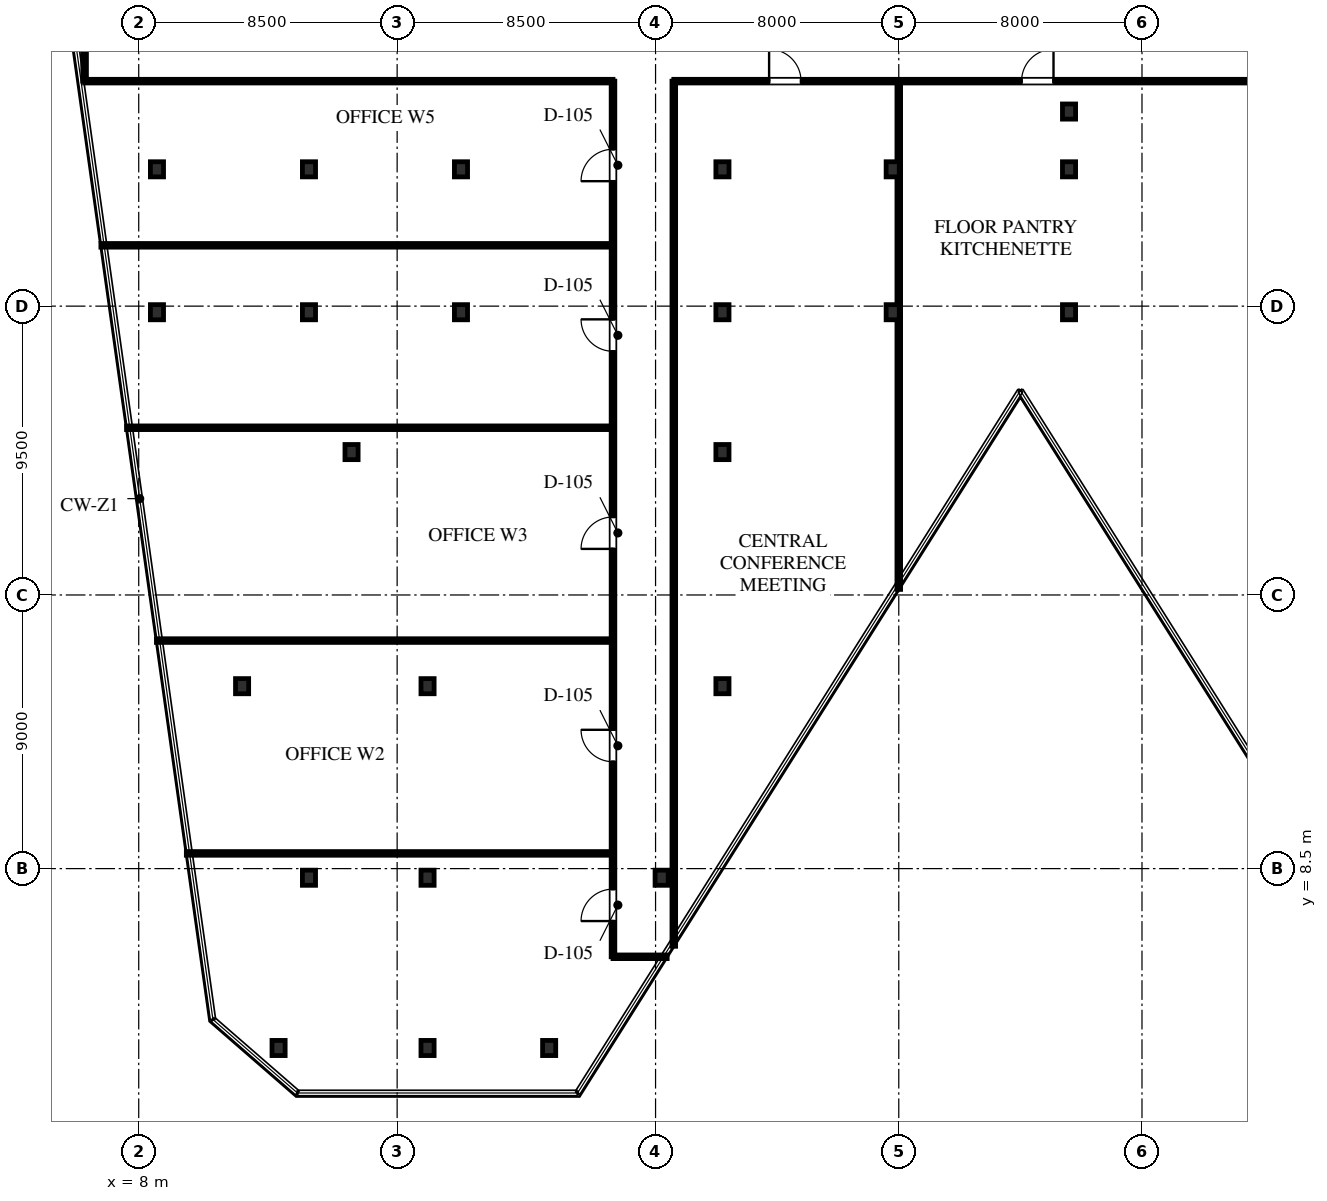
"""IFC4 building model, lengths in metres.
Left out: names, types, materials, properties, quantities, classifications, styles, units other than length and angle.
Written with IfcOpenShell. Run it as: python <this file> out.ifc"""

import sys

from ifc_helpers import new_model, si_unit, direction, frame, frame_2d, origin, origin_2d, place, context, subcontext, project, spatial, rectangle, i_section, extrude, element, fill, save


model = new_model("IFC4")
c1 = context("Model", 3, precision=1e-05, world=origin(), true_north=direction((0.0, 1.0)))
c2 = subcontext(c1, "Body", "Model", "MODEL_VIEW")
j1 = project(units=[si_unit("LENGTHUNIT", "METRE"), si_unit("PLANEANGLEUNIT", "RADIAN")], contexts=[c1])
p1 = place(None, origin())
s1 = spatial("IfcSite", under=j1, at=p1, CompositionType="ELEMENT")
p2 = place(p1, origin())
s2 = spatial("IfcBuilding", under=s1, at=p2, CompositionType="ELEMENT")
p3 = place(p2, frame((0.0, 0.0, 61.5)))
s3 = spatial("IfcBuildingStorey", under=s2, at=p3, CompositionType="ELEMENT", Elevation=61.5)
for number, where, z_axis, x_axis in (
    (1, (12.6, 2.6, 0.0), (0.0, 0.0, 1.0), (1.0, 0.0, 0.0)),
    (2, (15.0, 22.2, 0.0), (0.0, 0.0, 1.0), (1.0, 0.0, 0.0)),
    (3, (27.2, 22.2, 0.0), (0.0, 0.0, 1.0), (1.0, 0.0, 0.0)),
    (4, (8.6, 26.8, 0.0), (0.0, 0.0, 1.0), (1.0, 0.0, 0.0)),
    (5, (13.6, 26.8, 0.0), (0.0, 0.0, 1.0), (1.0, 0.0, 0.0)),
    (6, (18.6, 26.8, 0.0), (0.0, 0.0, 1.0), (1.0, 0.0, 0.0)),
    (7, (27.2, 26.8, 0.0), (0.0, 0.0, 1.0), (1.0, 0.0, 0.0)),
    (8, (32.8, 26.8, 0.0), (0.0, 0.0, 1.0), (1.0, 0.0, 0.0)),
    (9, (38.6, 26.8, 0.0), (0.0, 0.0, 1.0), (1.0, 0.0, 0.0)),
    (10, (8.6, 31.5, 0.0), (0.0, 0.0, 1.0), (1.0, 0.0, 0.0)),
    (11, (13.6, 31.5, 0.0), (0.0, 0.0, 1.0), (1.0, 0.0, 0.0)),
    (12, (17.5, 2.6, 0.0), (0.0, 0.0, 1.0), (1.0, 0.0, 0.0)),
    (13, (18.6, 31.5, 0.0), (0.0, 0.0, 1.0), (1.0, 0.0, 0.0)),
    (14, (27.2, 31.5, 0.0), (0.0, 0.0, 1.0), (1.0, 0.0, 0.0)),
    (15, (32.8, 31.5, 0.0), (0.0, 0.0, 1.0), (1.0, 0.0, 0.0)),
    (16, (38.6, 31.5, 0.0), (0.0, 0.0, 1.0), (1.0, 0.0, 0.0)),
    (17, (21.5, 2.6, 0.0), (0.0, 0.0, 1.0), (1.0, 0.0, 0.0)),
    (18, (13.6, 8.2, 0.0), (0.0, 0.0, 1.0), (1.0, 0.0, 0.0)),
    (19, (17.5, 8.2, 0.0), (0.0, 0.0, 1.0), (1.0, 0.0, 0.0)),
    (20, (25.2, 8.2, 0.0), (0.0, 0.0, 1.0), (1.0, 0.0, 0.0)),
    (21, (11.4, 14.5, 0.0), (0.0, 0.0, 1.0), (1.0, 0.0, 0.0)),
    (22, (17.5, 14.5, 0.0), (0.0, 0.0, 1.0), (1.0, 0.0, 0.0)),
    (23, (27.2, 14.5, 0.0), (0.0, 0.0, 1.0), (1.0, 0.0, 0.0)),
    (24, (38.6, 33.4, 0.0), (0.0, 0.0, 1.0), (1.0, 0.0, 0.0)),
):
    element("IfcColumn", number, at=place(p3, frame(where, z_axis=z_axis, x_axis=x_axis)), inside=s3, PredefinedType="COLUMN", context=c2, shape_type="SweptSolid", body=[
        extrude(i_section(OverallWidth=0.432, OverallDepth=0.498, WebThickness=0.056, FlangeThickness=0.089, FilletRadius=0.03, at=origin_2d()), origin(), (0.0, 0.0, 1.0), 4.0),
    ])
p4 = place(p3, frame((6.22, 34.4, 0.0), z_axis=(0.0, 0.0, 1.0), x_axis=(1.0, 0.0, 0.0)))
e25 = element("IfcWall", 25, at=p4, inside=s3, PredefinedType="PARTITIONING", context=c2, shape_type="SweptSolid", body=[
    extrude(rectangle(XDim=17.38, YDim=0.12, at=frame_2d((8.69, 0.0))), origin(), (0.0, 0.0, 1.0), 2.813),
])
p5 = place(p3, frame((25.6, 34.4, 0.0), z_axis=(0.0, 0.0, 1.0), x_axis=(1.0, 0.0, 0.0)))
e26 = element("IfcWall", 26, at=p5, inside=s3, PredefinedType="PARTITIONING", context=c2, shape_type="SweptSolid", body=[
    extrude(rectangle(XDim=27.5, YDim=0.12, at=frame_2d((13.75, 0.0))), origin(), (0.0, 0.0, 1.0), 2.813),
])
p6 = place(p5, frame((3.135, 0.0, 0.0)))
e27 = element("IfcOpeningElement", 27, at=p6, cuts=e26, PredefinedType="OPENING", context=c2, shape_type="SweptSolid", body=[
    extrude(rectangle(XDim=1.05, YDim=2.2, at=frame_2d((0.525, 1.1))), frame((0.0, 0.07, 0.0), z_axis=(0.0, -1.0, 0.0), x_axis=(1.0, 0.0, 0.0)), (0.0, 0.0, 1.0), 0.14),
])
p7 = place(p5, frame((11.44, 0.0, 0.0)))
e28 = element("IfcOpeningElement", 28, at=p7, cuts=e26, PredefinedType="OPENING", context=c2, shape_type="SweptSolid", body=[
    extrude(rectangle(XDim=1.05, YDim=2.2, at=frame_2d((0.525, 1.1))), frame((0.0, 0.07, 0.0), z_axis=(0.0, -1.0, 0.0), x_axis=(1.0, 0.0, 0.0)), (0.0, 0.0, 1.0), 0.14),
])
p8 = place(p3, frame((6.22, 34.4, 0.0), z_axis=(0.0, 0.0, 1.0), x_axis=(0.0, 1.0, 0.0)))
e29 = element("IfcWall", 29, at=p8, inside=s3, PredefinedType="PARTITIONING", context=c2, shape_type="SweptSolid", body=[
    extrude(rectangle(XDim=3.65, YDim=0.12, at=frame_2d((1.825, 0.0))), origin(), (0.0, 0.0, 1.0), 3.74),
])
p9 = place(p3, frame((23.6, 5.6, 0.0), z_axis=(0.0, 0.0, 1.0), x_axis=(0.0, 1.0, 0.0)))
e30 = element("IfcWall", 30, at=p9, inside=s3, PredefinedType="PARTITIONING", context=c2, shape_type="SweptSolid", body=[
    extrude(rectangle(XDim=28.8, YDim=0.12, at=frame_2d((14.4, 0.0))), origin(), (0.0, 0.0, 1.0), 2.813),
])
p10 = place(p9, frame((1.175, 0.0, 0.0)))
e31 = element("IfcOpeningElement", 31, at=p10, cuts=e30, PredefinedType="OPENING", context=c2, shape_type="SweptSolid", body=[
    extrude(rectangle(XDim=1.05, YDim=2.2, at=frame_2d((0.525, 1.1))), frame((0.0, 0.07, 0.0), z_axis=(0.0, -1.0, 0.0), x_axis=(1.0, 0.0, 0.0)), (0.0, 0.0, 1.0), 0.14),
])
p11 = place(p9, frame((6.416, 0.0, 0.0)))
e32 = element("IfcOpeningElement", 32, at=p11, cuts=e30, PredefinedType="OPENING", context=c2, shape_type="SweptSolid", body=[
    extrude(rectangle(XDim=1.05, YDim=2.2, at=frame_2d((0.525, 1.1))), frame((0.0, 0.07, 0.0), z_axis=(0.0, -1.0, 0.0), x_axis=(1.0, 0.0, 0.0)), (0.0, 0.0, 1.0), 0.14),
])
p12 = place(p9, frame((13.416, 0.0, 0.0)))
e33 = element("IfcOpeningElement", 33, at=p12, cuts=e30, PredefinedType="OPENING", context=c2, shape_type="SweptSolid", body=[
    extrude(rectangle(XDim=1.05, YDim=2.2, at=frame_2d((0.525, 1.1))), frame((0.0, 0.07, 0.0), z_axis=(0.0, -1.0, 0.0), x_axis=(1.0, 0.0, 0.0)), (0.0, 0.0, 1.0), 0.14),
])
p13 = place(p9, frame((19.915, 0.0, 0.0)))
e34 = element("IfcOpeningElement", 34, at=p13, cuts=e30, PredefinedType="OPENING", context=c2, shape_type="SweptSolid", body=[
    extrude(rectangle(XDim=1.05, YDim=2.2, at=frame_2d((0.525, 1.1))), frame((0.0, 0.07, 0.0), z_axis=(0.0, -1.0, 0.0), x_axis=(1.0, 0.0, 0.0)), (0.0, 0.0, 1.0), 0.14),
])
p14 = place(p9, frame((25.51, 0.0, 0.0)))
e35 = element("IfcOpeningElement", 35, at=p14, cuts=e30, PredefinedType="OPENING", context=c2, shape_type="SweptSolid", body=[
    extrude(rectangle(XDim=1.05, YDim=2.2, at=frame_2d((0.525, 1.1))), frame((0.0, 0.07, 0.0), z_axis=(0.0, -1.0, 0.0), x_axis=(1.0, 0.0, 0.0)), (0.0, 0.0, 1.0), 0.14),
])
p15 = place(p3, frame((25.6, 5.945, 0.0), z_axis=(0.0, 0.0, 1.0), x_axis=(0.0, 1.0, 0.0)))
e36 = element("IfcWall", 36, at=p15, inside=s3, PredefinedType="PARTITIONING", context=c2, shape_type="SweptSolid", body=[
    extrude(rectangle(XDim=28.455, YDim=0.12, at=frame_2d((14.227, 0.0))), origin(), (0.0, 0.0, 1.0), 2.813),
])
p16 = place(p3, frame((23.6, 5.6, 0.0), z_axis=(0.0, 0.0, 1.0), x_axis=(1.0, 0.0, 0.0)))
e37 = element("IfcWall", 37, at=p16, inside=s3, PredefinedType="PARTITIONING", context=c2, shape_type="SweptSolid", body=[
    extrude(rectangle(XDim=1.782, YDim=0.12, at=frame_2d((0.891, 0.0))), origin(), (0.0, 0.0, 1.0), 2.978),
])
p17 = place(p3, frame((9.566, 9.0, 0.0), z_axis=(0.0, 0.0, 1.0), x_axis=(1.0, 0.0, 0.0)))
e38 = element("IfcWall", 38, at=p17, inside=s3, PredefinedType="PARTITIONING", context=c2, shape_type="SweptSolid", body=[
    extrude(rectangle(XDim=13.966, YDim=0.12, at=frame_2d((6.983, 0.0))), origin(), (0.0, 0.0, 1.0), 2.813),
])
p18 = place(p3, frame((8.583, 16.0, 0.0), z_axis=(0.0, 0.0, 1.0), x_axis=(1.0, 0.0, 0.0)))
e39 = element("IfcWall", 39, at=p18, inside=s3, PredefinedType="PARTITIONING", context=c2, shape_type="SweptSolid", body=[
    extrude(rectangle(XDim=14.949, YDim=0.12, at=frame_2d((7.475, 0.0))), origin(), (0.0, 0.0, 1.0), 2.978),
])
p19 = place(p3, frame((7.599, 23.0, 0.0), z_axis=(0.0, 0.0, 1.0), x_axis=(1.0, 0.0, 0.0)))
e40 = element("IfcWall", 40, at=p19, inside=s3, PredefinedType="PARTITIONING", context=c2, shape_type="SweptSolid", body=[
    extrude(rectangle(XDim=15.933, YDim=0.12, at=frame_2d((7.967, 0.0))), origin(), (0.0, 0.0, 1.0), 2.978),
])
p20 = place(p3, frame((6.756, 29.0, 0.0), z_axis=(0.0, 0.0, 1.0), x_axis=(1.0, 0.0, 0.0)))
e41 = element("IfcWall", 41, at=p20, inside=s3, PredefinedType="PARTITIONING", context=c2, shape_type="SweptSolid", body=[
    extrude(rectangle(XDim=16.776, YDim=0.12, at=frame_2d((8.388, 0.0))), origin(), (0.0, 0.0, 1.0), 2.813),
])
p21 = place(p3, frame((33.0, 17.683, 0.0), z_axis=(0.0, 0.0, 1.0), x_axis=(0.0, 1.0, 0.0)))
e42 = element("IfcWall", 42, at=p21, inside=s3, PredefinedType="PARTITIONING", context=c2, shape_type="SweptSolid", body=[
    extrude(rectangle(XDim=16.649, YDim=0.12, at=frame_2d((8.324, 0.0))), origin(), (0.0, 0.0, 1.0), 2.813),
])
p22 = place(p10, origin())
e43 = element("IfcDoor", 43, at=p22, inside=s3, OperationType="SINGLE_SWING_LEFT", PredefinedType="DOOR", context=c2, shape_type="SweptSolid", body=[
    extrude(rectangle(XDim=1.05, YDim=2.2, at=frame_2d((0.525, 1.1))), frame((0.0, 0.025, 0.0), z_axis=(0.0, -1.0, 0.0), x_axis=(1.0, 0.0, 0.0)), (0.0, 0.0, 1.0), 0.05),
])
fill(e31, e43)
p23 = place(p11, origin())
e44 = element("IfcDoor", 44, at=p23, inside=s3, OperationType="SINGLE_SWING_RIGHT", PredefinedType="DOOR", context=c2, shape_type="SweptSolid", body=[
    extrude(rectangle(XDim=1.05, YDim=2.2, at=frame_2d((0.525, 1.1))), frame((0.0, 0.025, 0.0), z_axis=(0.0, -1.0, 0.0), x_axis=(1.0, 0.0, 0.0)), (0.0, 0.0, 1.0), 0.05),
])
fill(e32, e44)
p24 = place(p12, origin())
e45 = element("IfcDoor", 45, at=p24, inside=s3, OperationType="SINGLE_SWING_LEFT", PredefinedType="DOOR", context=c2, shape_type="SweptSolid", body=[
    extrude(rectangle(XDim=1.05, YDim=2.2, at=frame_2d((0.525, 1.1))), frame((0.0, 0.025, 0.0), z_axis=(0.0, -1.0, 0.0), x_axis=(1.0, 0.0, 0.0)), (0.0, 0.0, 1.0), 0.05),
])
fill(e33, e45)
p25 = place(p13, origin())
e46 = element("IfcDoor", 46, at=p25, inside=s3, OperationType="SINGLE_SWING_RIGHT", PredefinedType="DOOR", context=c2, shape_type="SweptSolid", body=[
    extrude(rectangle(XDim=1.05, YDim=2.2, at=frame_2d((0.525, 1.1))), frame((0.0, 0.025, 0.0), z_axis=(0.0, -1.0, 0.0), x_axis=(1.0, 0.0, 0.0)), (0.0, 0.0, 1.0), 0.05),
])
fill(e34, e46)
p26 = place(p14, origin())
e47 = element("IfcDoor", 47, at=p26, inside=s3, OperationType="SINGLE_SWING_LEFT", PredefinedType="DOOR", context=c2, shape_type="SweptSolid", body=[
    extrude(rectangle(XDim=1.05, YDim=2.2, at=frame_2d((0.525, 1.1))), frame((0.0, 0.025, 0.0), z_axis=(0.0, -1.0, 0.0), x_axis=(1.0, 0.0, 0.0)), (0.0, 0.0, 1.0), 0.05),
])
fill(e35, e47)
p27 = place(p6, origin())
e48 = element("IfcDoor", 48, at=p27, inside=s3, OperationType="SINGLE_SWING_LEFT", PredefinedType="DOOR", context=c2, shape_type="SweptSolid", body=[
    extrude(rectangle(XDim=1.05, YDim=2.2, at=frame_2d((0.525, 1.1))), frame((0.0, 0.025, 0.0), z_axis=(0.0, -1.0, 0.0), x_axis=(1.0, 0.0, 0.0)), (0.0, 0.0, 1.0), 0.05),
])
fill(e27, e48)
p28 = place(p7, origin())
e49 = element("IfcDoor", 49, at=p28, inside=s3, OperationType="SINGLE_SWING_RIGHT", PredefinedType="DOOR", context=c2, shape_type="SweptSolid", body=[
    extrude(rectangle(XDim=1.05, YDim=2.2, at=frame_2d((0.525, 1.1))), frame((0.0, 0.025, 0.0), z_axis=(0.0, -1.0, 0.0), x_axis=(1.0, 0.0, 0.0)), (0.0, 0.0, 1.0), 0.05),
])
fill(e28, e49)
save(model, sys.argv[1])
